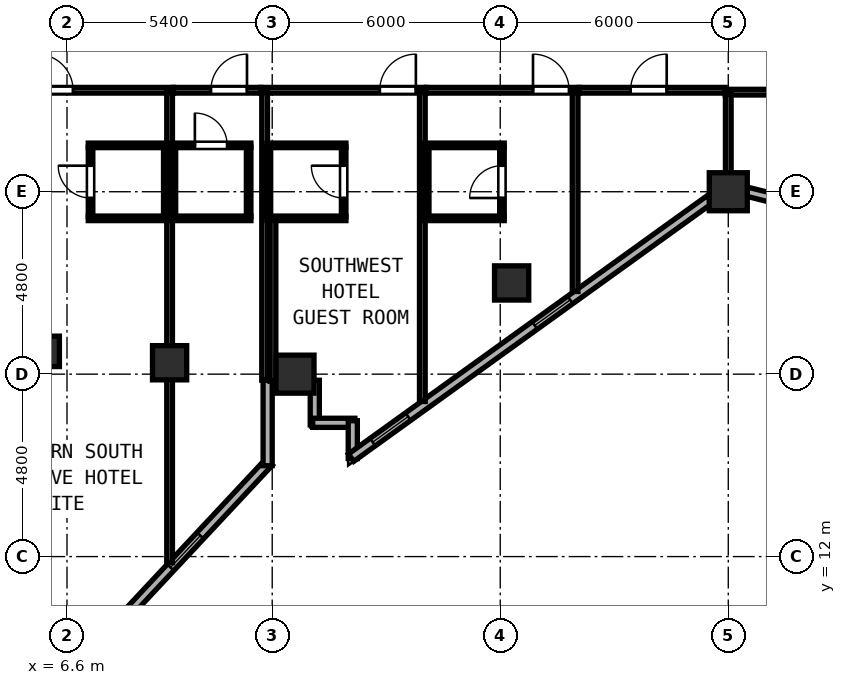
"""IFC4 building model, lengths in metres.
Left out: names, types, materials, properties, quantities, classifications, styles, units other than length and angle.
Written with IfcOpenShell. Run it as: python <this file> out.ifc"""

import sys

from ifc_helpers import new_model, si_unit, direction, frame, frame_2d, origin, origin_2d, place, context, subcontext, project, spatial, rectangle, hollow_rectangle, extrude, element, fill, save


model = new_model("IFC4")
c1 = context("Model", 3, precision=1e-05, world=origin(), true_north=direction((0.0, 1.0)))
c2 = subcontext(c1, "Body", "Model", "MODEL_VIEW")
j1 = project(units=[si_unit("LENGTHUNIT", "METRE"), si_unit("PLANEANGLEUNIT", "RADIAN")], contexts=[c1])
p1 = place(None, origin())
s1 = spatial("IfcSite", under=j1, at=p1, CompositionType="ELEMENT")
p2 = place(p1, origin())
s2 = spatial("IfcBuilding", under=s1, at=p2, CompositionType="ELEMENT")
p3 = place(p2, frame((0.0, 0.0, 98.4)))
s3 = spatial("IfcBuildingStorey", under=s2, at=p3, CompositionType="ELEMENT", Elevation=98.4)
for number, where, z_axis, x_axis in (
    (1, (24.0, 21.6, 0.0), (0.0, 0.0, 1.0), (1.0, 0.0, 0.0)),
    (2, (12.6, 16.8, 0.0), (0.0, 0.0, 1.0), (1.0, 0.0, 0.0)),
):
    element("IfcColumn", number, at=place(p3, frame(where, z_axis=z_axis, x_axis=x_axis)), inside=s3, PredefinedType="COLUMN", context=c2, shape_type="SweptSolid", body=[
        extrude(hollow_rectangle(XDim=1.0, YDim=1.0, WallThickness=0.038, at=origin_2d()), origin(), (0.0, 0.0, 1.0), 3.8),
    ])
p4 = place(p3, frame((6.0, 17.4, 0.0), z_axis=(0.0, 0.0, 1.0), x_axis=(1.0, 0.0, 0.0)))
e3 = element("IfcColumn", 3, at=p4, inside=s3, PredefinedType="COLUMN", context=c2, shape_type="SweptSolid", body=[
    extrude(hollow_rectangle(XDim=0.8, YDim=0.8, WallThickness=0.03, at=origin_2d()), origin(), (0.0, 0.0, 1.0), 3.8),
])
for number, where, z_axis, x_axis in (
    (4, (18.3, 19.2, 0.0), (0.0, 0.0, 1.0), (1.0, 0.0, 0.0)),
    (5, (9.3, 17.1, 0.0), (0.0, 0.0, 1.0), (1.0, 0.0, 0.0)),
):
    element("IfcColumn", number, at=place(p3, frame(where, z_axis=z_axis, x_axis=x_axis)), inside=s3, PredefinedType="COLUMN", context=c2, shape_type="SweptSolid", body=[
        extrude(hollow_rectangle(XDim=0.9, YDim=0.9, WallThickness=0.034, at=origin_2d()), origin(), (0.0, 0.0, 1.0), 3.8),
    ])
p5 = place(p3, frame((13.12, 16.64, 0.0), z_axis=(0.0, 0.0, 1.0), x_axis=(0.0, -1.0, 0.0)))
e6 = element("IfcWall", 6, at=p5, inside=s3, PredefinedType="SOLIDWALL", context=c2, shape_type="SweptSolid", body=[
    extrude(rectangle(XDim=1.175, YDim=0.24, at=frame_2d((0.587, 0.0))), origin(), (0.0, 0.0, 1.0), 3.6),
])
p6 = place(p3, frame((13.065, 15.52, 0.0), z_axis=(0.0, 0.0, 1.0), x_axis=(1.0, 0.0, 0.0)))
e7 = element("IfcWall", 7, at=p6, inside=s3, PredefinedType="SOLIDWALL", context=c2, shape_type="SweptSolid", body=[
    extrude(rectangle(XDim=1.11, YDim=0.24, at=frame_2d((0.555, 0.0))), origin(), (0.0, 0.0, 1.0), 3.6),
])
p7 = place(p3, frame((14.12, 15.575, 0.0), z_axis=(0.0, 0.0, 1.0), x_axis=(0.0, -1.0, 0.0)))
e8 = element("IfcWall", 8, at=p7, inside=s3, PredefinedType="SOLIDWALL", context=c2, shape_type="SweptSolid", body=[
    extrude(rectangle(XDim=0.996, YDim=0.24, at=frame_2d((0.498, 0.0))), origin(), (0.0, 0.0, 1.0), 3.6),
])
p8 = place(p3, frame((14.075, 14.602, 0.0), z_axis=(0.0, 0.0, 1.0), x_axis=(0.811543504691, 0.584291998913, 0.0)))
e9 = element("IfcWall", 9, at=p8, inside=s3, PredefinedType="SOLIDWALL", context=c2, shape_type="SweptSolid", body=[
    extrude(rectangle(XDim=11.623, YDim=0.24, at=frame_2d((5.812, 0.0))), origin(), (0.0, 0.0, 1.0), 3.145),
])
p9 = place(p8, frame((0.7, 0.0, 0.85)))
e10 = element("IfcOpeningElement", 10, at=p9, cuts=e9, PredefinedType="OPENING", context=c2, shape_type="SweptSolid", body=[
    extrude(rectangle(XDim=1.15, YDim=1.8, at=frame_2d((0.575, 0.9))), frame((0.0, 0.13, 0.0), z_axis=(0.0, -1.0, 0.0), x_axis=(1.0, 0.0, 0.0)), (0.0, 0.0, 1.0), 0.26),
])
p10 = place(p8, frame((5.954, 0.0, 0.85)))
e11 = element("IfcOpeningElement", 11, at=p10, cuts=e9, PredefinedType="OPENING", context=c2, shape_type="SweptSolid", body=[
    extrude(rectangle(XDim=1.15, YDim=1.8, at=frame_2d((0.575, 0.9))), frame((0.0, 0.13, 0.0), z_axis=(0.0, -1.0, 0.0), x_axis=(1.0, 0.0, 0.0)), (0.0, 0.0, 1.0), 0.26),
])
p11 = place(p3, frame((24.492, 21.601, 0.0), z_axis=(0.0, 0.0, 1.0), x_axis=(0.970145683738, -0.242522890311, 0.0)))
e12 = element("IfcWall", 12, at=p11, inside=s3, PredefinedType="SOLIDWALL", context=c2, shape_type="SweptSolid", body=[
    extrude(rectangle(XDim=4.511, YDim=0.24, at=frame_2d((2.255, 0.0))), origin(), (0.0, 0.0, 1.0), 3.145),
])
p12 = place(p11, frame((0.7, 0.0, 0.85)))
e13 = element("IfcOpeningElement", 13, at=p12, cuts=e12, PredefinedType="OPENING", context=c2, shape_type="SweptSolid", body=[
    extrude(rectangle(XDim=1.15, YDim=1.8, at=frame_2d((0.575, 0.9))), frame((0.0, 0.13, 0.0), z_axis=(0.0, -1.0, 0.0), x_axis=(1.0, 0.0, 0.0)), (0.0, 0.0, 1.0), 0.26),
])
p13 = place(p3, frame((5.158, 7.257, 0.0), z_axis=(0.0, 0.0, 1.0), x_axis=(0.68291649943, 0.730496444075, 0.0)))
e14 = element("IfcWall", 14, at=p13, inside=s3, PredefinedType="SOLIDWALL", context=c2, shape_type="SweptSolid", body=[
    extrude(rectangle(XDim=9.898, YDim=0.24, at=frame_2d((4.949, 0.0))), origin(), (0.0, 0.0, 1.0), 3.6),
])
p14 = place(p13, frame((0.7, 0.0, 0.85)))
e15 = element("IfcOpeningElement", 15, at=p14, cuts=e14, PredefinedType="OPENING", context=c2, shape_type="SweptSolid", body=[
    extrude(rectangle(XDim=1.15, YDim=1.8, at=frame_2d((0.575, 0.9))), frame((0.0, 0.13, 0.0), z_axis=(0.0, -1.0, 0.0), x_axis=(1.0, 0.0, 0.0)), (0.0, 0.0, 1.0), 0.26),
])
p15 = place(p13, frame((6.1, 0.0, 0.85)))
e16 = element("IfcOpeningElement", 16, at=p15, cuts=e14, PredefinedType="OPENING", context=c2, shape_type="SweptSolid", body=[
    extrude(rectangle(XDim=1.15, YDim=1.8, at=frame_2d((0.575, 0.9))), frame((0.0, 0.13, 0.0), z_axis=(0.0, -1.0, 0.0), x_axis=(1.0, 0.0, 0.0)), (0.0, 0.0, 1.0), 0.26),
])
p16 = place(p3, frame((11.88, 14.392, 0.0), z_axis=(0.0, 0.0, 1.0), x_axis=(0.0, 1.0, 0.0)))
e17 = element("IfcWall", 17, at=p16, inside=s3, PredefinedType="SOLIDWALL", context=c2, shape_type="SweptSolid", body=[
    extrude(rectangle(XDim=2.248, YDim=0.24, at=frame_2d((1.124, 0.0))), origin(), (0.0, 0.0, 1.0), 3.6),
])
p17 = place(p3, frame((23.92, 24.22, 0.0), z_axis=(0.0, 0.0, 1.0), x_axis=(1.0, 0.0, 0.0)))
e18 = element("IfcWall", 18, at=p17, inside=s3, PredefinedType="PARTITIONING", context=c2, shape_type="SweptSolid", body=[
    extrude(rectangle(XDim=7.36, YDim=0.15, at=frame_2d((3.68, 0.0))), origin(), (0.0, 0.0, 1.0), 3.6),
])
p18 = place(p17, frame((4.075, 0.0, 0.0), z_axis=(0.0, 0.0, 1.0), x_axis=(-1.0, 0.0, 0.0)))
e19 = element("IfcOpeningElement", 19, at=p18, cuts=e18, PredefinedType="OPENING", context=c2, shape_type="SweptSolid", body=[
    extrude(rectangle(XDim=0.95, YDim=2.12, at=frame_2d((0.475, 1.06))), frame((0.0, 0.085, 0.0), z_axis=(0.0, -1.0, 0.0), x_axis=(1.0, 0.0, 0.0)), (0.0, 0.0, 1.0), 0.17),
])
p19 = place(p3, frame((24.0, 21.819, 0.0), z_axis=(0.0, 0.0, 1.0), x_axis=(0.0, 1.0, 0.0)))
e20 = element("IfcWall", 20, at=p19, inside=s3, PredefinedType="PARTITIONING", context=c2, shape_type="SweptSolid", body=[
    extrude(rectangle(XDim=2.341, YDim=0.15, at=frame_2d((1.171, 0.0))), origin(), (0.0, 0.0, 1.0), 3.145),
])
p20 = place(p3, frame((11.7, 24.27, 0.0), z_axis=(0.0, 0.0, 1.0), x_axis=(1.0, 0.0, 0.0)))
e21 = element("IfcWall", 21, at=p20, inside=s3, PredefinedType="PARTITIONING", context=c2, shape_type="SweptSolid", body=[
    extrude(rectangle(XDim=4.35, YDim=0.15, at=frame_2d((2.175, 0.0))), origin(), (0.0, 0.0, 1.0), 3.6),
])
p21 = place(p20, frame((4.08, 0.0, 0.0), z_axis=(0.0, 0.0, 1.0), x_axis=(-1.0, 0.0, 0.0)))
e22 = element("IfcOpeningElement", 22, at=p21, cuts=e21, PredefinedType="OPENING", context=c2, shape_type="SweptSolid", body=[
    extrude(rectangle(XDim=0.95, YDim=2.15, at=frame_2d((0.475, 1.075))), frame((0.0, 0.085, 0.0), z_axis=(0.0, -1.0, 0.0), x_axis=(1.0, 0.0, 0.0)), (0.0, 0.0, 1.0), 0.17),
])
p22 = place(p3, frame((11.8, 16.642, 0.0), z_axis=(0.0, 0.0, 1.0), x_axis=(0.0, 1.0, 0.0)))
e23 = element("IfcWall", 23, at=p22, inside=s3, PredefinedType="PARTITIONING", context=c2, shape_type="SweptSolid", body=[
    extrude(rectangle(XDim=7.568, YDim=0.15, at=frame_2d((3.784, 0.0))), origin(), (0.0, 0.0, 1.0), 3.6),
])
p23 = place(p3, frame((15.95, 16.081, 0.0), z_axis=(0.0, 0.0, 1.0), x_axis=(0.0, 1.0, 0.0)))
e24 = element("IfcWall", 24, at=p23, inside=s3, PredefinedType="PARTITIONING", context=c2, shape_type="SweptSolid", body=[
    extrude(rectangle(XDim=8.129, YDim=0.15, at=frame_2d((4.064, 0.0))), origin(), (0.0, 0.0, 1.0), 3.6),
])
for number, where, z_axis, x_axis in (
    (25, (11.86, 22.82, 0.0), (0.0, 0.0, 1.0), (1.0, 0.0, 0.0)),
    (26, (11.86, 20.9, 0.0), (0.0, 0.0, 1.0), (1.0, 0.0, 0.0)),
):
    element("IfcWall", number, at=place(p3, frame(where, z_axis=z_axis, x_axis=x_axis)), inside=s3, PredefinedType="PARTITIONING", context=c2, shape_type="SweptSolid", body=[
        extrude(rectangle(XDim=2.08, YDim=0.12, at=frame_2d((1.04, 0.0))), origin(), (0.0, 0.0, 1.0), 3.6),
    ])
p24 = place(p3, frame((11.9, 20.945, 0.0), z_axis=(0.0, 0.0, 1.0), x_axis=(0.0, 1.0, 0.0)))
e27 = element("IfcWall", 27, at=p24, inside=s3, PredefinedType="PARTITIONING", context=c2, shape_type="SweptSolid", body=[
    extrude(rectangle(XDim=1.83, YDim=0.12, at=frame_2d((0.915, 0.0))), origin(), (0.0, 0.0, 1.0), 3.6),
])
p25 = place(p3, frame((13.88, 20.945, 0.0), z_axis=(0.0, 0.0, 1.0), x_axis=(0.0, 1.0, 0.0)))
e28 = element("IfcWall", 28, at=p25, inside=s3, PredefinedType="PARTITIONING", context=c2, shape_type="SweptSolid", body=[
    extrude(rectangle(XDim=1.83, YDim=0.12, at=frame_2d((0.915, 0.0))), origin(), (0.0, 0.0, 1.0), 3.6),
])
p26 = place(p25, frame((0.49, 0.0, 0.0)))
e29 = element("IfcOpeningElement", 29, at=p26, cuts=e28, PredefinedType="OPENING", context=c2, shape_type="SweptSolid", body=[
    extrude(rectangle(XDim=0.85, YDim=2.1, at=frame_2d((0.425, 1.05))), frame((0.0, 0.07, 0.0), z_axis=(0.0, -1.0, 0.0), x_axis=(1.0, 0.0, 0.0)), (0.0, 0.0, 1.0), 0.14),
])
p27 = place(p3, frame((16.052, 24.27, 0.0), z_axis=(0.0, 0.0, 1.0), x_axis=(1.0, 0.0, 0.0)))
e30 = element("IfcWall", 30, at=p27, inside=s3, PredefinedType="PARTITIONING", context=c2, shape_type="SweptSolid", body=[
    extrude(rectangle(XDim=4.018, YDim=0.15, at=frame_2d((2.009, 0.0))), origin(), (0.0, 0.0, 1.0), 3.6),
])
p28 = place(p27, frame((3.76, 0.0, 0.0), z_axis=(0.0, 0.0, 1.0), x_axis=(-1.0, 0.0, 0.0)))
e31 = element("IfcOpeningElement", 31, at=p28, cuts=e30, PredefinedType="OPENING", context=c2, shape_type="SweptSolid", body=[
    extrude(rectangle(XDim=0.95, YDim=2.15, at=frame_2d((0.475, 1.075))), frame((0.0, 0.085, 0.0), z_axis=(0.0, -1.0, 0.0), x_axis=(1.0, 0.0, 0.0)), (0.0, 0.0, 1.0), 0.17),
])
p29 = place(p3, frame((19.97, 18.976, 0.0), z_axis=(0.0, 0.0, 1.0), x_axis=(0.0, 1.0, 0.0)))
e32 = element("IfcWall", 32, at=p29, inside=s3, PredefinedType="PARTITIONING", context=c2, shape_type="SweptSolid", body=[
    extrude(rectangle(XDim=5.234, YDim=0.15, at=frame_2d((2.617, 0.0))), origin(), (0.0, 0.0, 1.0), 3.6),
])
for number, where, z_axis, x_axis in (
    (33, (16.01, 22.82, 0.0), (0.0, 0.0, 1.0), (1.0, 0.0, 0.0)),
    (34, (16.01, 20.9, 0.0), (0.0, 0.0, 1.0), (1.0, 0.0, 0.0)),
):
    element("IfcWall", number, at=place(p3, frame(where, z_axis=z_axis, x_axis=x_axis)), inside=s3, PredefinedType="PARTITIONING", context=c2, shape_type="SweptSolid", body=[
        extrude(rectangle(XDim=2.095, YDim=0.12, at=frame_2d((1.047, 0.0))), origin(), (0.0, 0.0, 1.0), 3.6),
    ])
p30 = place(p3, frame((16.065, 20.945, 0.0), z_axis=(0.0, 0.0, 1.0), x_axis=(0.0, 1.0, 0.0)))
e35 = element("IfcWall", 35, at=p30, inside=s3, PredefinedType="PARTITIONING", context=c2, shape_type="SweptSolid", body=[
    extrude(rectangle(XDim=1.83, YDim=0.12, at=frame_2d((0.915, 0.0))), origin(), (0.0, 0.0, 1.0), 3.6),
])
p31 = place(p3, frame((18.045, 20.945, 0.0), z_axis=(0.0, 0.0, 1.0), x_axis=(0.0, 1.0, 0.0)))
e36 = element("IfcWall", 36, at=p31, inside=s3, PredefinedType="PARTITIONING", context=c2, shape_type="SweptSolid", body=[
    extrude(rectangle(XDim=1.83, YDim=0.12, at=frame_2d((0.915, 0.0))), origin(), (0.0, 0.0, 1.0), 3.6),
])
p32 = place(p31, frame((0.49, 0.0, 0.0)))
e37 = element("IfcOpeningElement", 37, at=p32, cuts=e36, PredefinedType="OPENING", context=c2, shape_type="SweptSolid", body=[
    extrude(rectangle(XDim=0.85, YDim=2.1, at=frame_2d((0.425, 1.05))), frame((0.0, 0.07, 0.0), z_axis=(0.0, -1.0, 0.0), x_axis=(1.0, 0.0, 0.0)), (0.0, 0.0, 1.0), 0.14),
])
p33 = place(p3, frame((20.072, 24.27, 0.0), z_axis=(0.0, 0.0, 1.0), x_axis=(1.0, 0.0, 0.0)))
e38 = element("IfcWall", 38, at=p33, inside=s3, PredefinedType="PARTITIONING", context=c2, shape_type="SweptSolid", body=[
    extrude(rectangle(XDim=3.846, YDim=0.15, at=frame_2d((1.923, 0.0))), origin(), (0.0, 0.0, 1.0), 3.6),
])
p34 = place(p33, frame((2.308, 0.0, 0.0), z_axis=(0.0, 0.0, 1.0), x_axis=(-1.0, 0.0, 0.0)))
e39 = element("IfcOpeningElement", 39, at=p34, cuts=e38, PredefinedType="OPENING", context=c2, shape_type="SweptSolid", body=[
    extrude(rectangle(XDim=0.95, YDim=2.12, at=frame_2d((0.475, 1.06))), frame((0.0, 0.085, 0.0), z_axis=(0.0, -1.0, 0.0), x_axis=(1.0, 0.0, 0.0)), (0.0, 0.0, 1.0), 0.17),
])
p35 = place(p3, frame((3.405, 24.27, 0.0), z_axis=(0.0, 0.0, 1.0), x_axis=(1.0, 0.0, 0.0)))
e40 = element("IfcWall", 40, at=p35, inside=s3, PredefinedType="PARTITIONING", context=c2, shape_type="SweptSolid", body=[
    extrude(rectangle(XDim=5.995, YDim=0.15, at=frame_2d((2.998, 0.0))), origin(), (0.0, 0.0, 1.0), 3.6),
])
p36 = place(p35, frame((3.355, 0.0, 0.0), z_axis=(0.0, 0.0, 1.0), x_axis=(-1.0, 0.0, 0.0)))
e41 = element("IfcOpeningElement", 41, at=p36, cuts=e40, PredefinedType="OPENING", context=c2, shape_type="SweptSolid", body=[
    extrude(rectangle(XDim=0.95, YDim=2.18, at=frame_2d((0.475, 1.09))), frame((0.0, 0.085, 0.0), z_axis=(0.0, -1.0, 0.0), x_axis=(1.0, 0.0, 0.0)), (0.0, 0.0, 1.0), 0.17),
])
p37 = place(p3, frame((9.3, 11.841, 0.0), z_axis=(0.0, 0.0, 1.0), x_axis=(0.0, 1.0, 0.0)))
e42 = element("IfcWall", 42, at=p37, inside=s3, PredefinedType="PARTITIONING", context=c2, shape_type="SweptSolid", body=[
    extrude(rectangle(XDim=12.369, YDim=0.15, at=frame_2d((6.184, 0.0))), origin(), (0.0, 0.0, 1.0), 3.6),
])
for number, where, z_axis, x_axis in (
    (43, (7.16, 22.82, 0.0), (0.0, 0.0, 1.0), (1.0, 0.0, 0.0)),
    (44, (7.16, 20.9, 0.0), (0.0, 0.0, 1.0), (1.0, 0.0, 0.0)),
):
    element("IfcWall", number, at=place(p3, frame(where, z_axis=z_axis, x_axis=x_axis)), inside=s3, PredefinedType="PARTITIONING", context=c2, shape_type="SweptSolid", body=[
        extrude(rectangle(XDim=2.08, YDim=0.12, at=frame_2d((1.04, 0.0))), origin(), (0.0, 0.0, 1.0), 3.6),
    ])
p38 = place(p3, frame((7.22, 20.945, 0.0), z_axis=(0.0, 0.0, 1.0), x_axis=(0.0, 1.0, 0.0)))
e45 = element("IfcWall", 45, at=p38, inside=s3, PredefinedType="PARTITIONING", context=c2, shape_type="SweptSolid", body=[
    extrude(rectangle(XDim=1.83, YDim=0.12, at=frame_2d((0.915, 0.0))), origin(), (0.0, 0.0, 1.0), 3.6),
])
p39 = place(p38, frame((1.34, 0.0, 0.0), z_axis=(0.0, 0.0, 1.0), x_axis=(-1.0, 0.0, 0.0)))
e46 = element("IfcOpeningElement", 46, at=p39, cuts=e45, PredefinedType="OPENING", context=c2, shape_type="SweptSolid", body=[
    extrude(rectangle(XDim=0.85, YDim=2.1, at=frame_2d((0.425, 1.05))), frame((0.0, 0.07, 0.0), z_axis=(0.0, -1.0, 0.0), x_axis=(1.0, 0.0, 0.0)), (0.0, 0.0, 1.0), 0.14),
])
p40 = place(p3, frame((9.2, 20.945, 0.0), z_axis=(0.0, 0.0, 1.0), x_axis=(0.0, 1.0, 0.0)))
e47 = element("IfcWall", 47, at=p40, inside=s3, PredefinedType="PARTITIONING", context=c2, shape_type="SweptSolid", body=[
    extrude(rectangle(XDim=1.83, YDim=0.12, at=frame_2d((0.915, 0.0))), origin(), (0.0, 0.0, 1.0), 3.6),
])
p41 = place(p3, frame((9.402, 24.27, 0.0), z_axis=(0.0, 0.0, 1.0), x_axis=(1.0, 0.0, 0.0)))
e48 = element("IfcWall", 48, at=p41, inside=s3, PredefinedType="PARTITIONING", context=c2, shape_type="SweptSolid", body=[
    extrude(rectangle(XDim=2.296, YDim=0.15, at=frame_2d((1.148, 0.0))), origin(), (0.0, 0.0, 1.0), 3.6),
])
p42 = place(p41, frame((1.934, 0.0, 0.0), z_axis=(0.0, 0.0, 1.0), x_axis=(-1.0, 0.0, 0.0)))
e49 = element("IfcOpeningElement", 49, at=p42, cuts=e48, PredefinedType="OPENING", context=c2, shape_type="SweptSolid", body=[
    extrude(rectangle(XDim=0.95, YDim=2.15, at=frame_2d((0.475, 1.075))), frame((0.0, 0.085, 0.0), z_axis=(0.0, -1.0, 0.0), x_axis=(1.0, 0.0, 0.0)), (0.0, 0.0, 1.0), 0.17),
])
p43 = place(p3, frame((12.02, 16.612, 0.0), z_axis=(0.0, 0.0, 1.0), x_axis=(0.0, 1.0, 0.0)))
e50 = element("IfcWall", 50, at=p43, inside=s3, PredefinedType="PARTITIONING", context=c2, shape_type="SweptSolid", body=[
    extrude(rectangle(XDim=4.243, YDim=0.15, at=frame_2d((2.122, 0.0))), origin(), (0.0, 0.0, 1.0), 3.6),
])
p44 = place(p3, frame((9.36, 22.82, 0.0), z_axis=(0.0, 0.0, 1.0), x_axis=(1.0, 0.0, 0.0)))
e51 = element("IfcWall", 51, at=p44, inside=s3, PredefinedType="PARTITIONING", context=c2, shape_type="SweptSolid", body=[
    extrude(rectangle(XDim=2.08, YDim=0.12, at=frame_2d((1.04, 0.0))), origin(), (0.0, 0.0, 1.0), 3.6),
])
p45 = place(p44, frame((1.455, 0.0, 0.0), z_axis=(0.0, 0.0, 1.0), x_axis=(-1.0, 0.0, 0.0)))
e52 = element("IfcOpeningElement", 52, at=p45, cuts=e51, PredefinedType="OPENING", context=c2, shape_type="SweptSolid", body=[
    extrude(rectangle(XDim=0.85, YDim=2.1, at=frame_2d((0.425, 1.05))), frame((0.0, 0.07, 0.0), z_axis=(0.0, -1.0, 0.0), x_axis=(1.0, 0.0, 0.0)), (0.0, 0.0, 1.0), 0.14),
])
p46 = place(p3, frame((9.36, 20.9, 0.0), z_axis=(0.0, 0.0, 1.0), x_axis=(1.0, 0.0, 0.0)))
e53 = element("IfcWall", 53, at=p46, inside=s3, PredefinedType="PARTITIONING", context=c2, shape_type="SweptSolid", body=[
    extrude(rectangle(XDim=2.08, YDim=0.12, at=frame_2d((1.04, 0.0))), origin(), (0.0, 0.0, 1.0), 3.6),
])
for number, where, z_axis, x_axis in (
    (54, (9.4, 20.945, 0.0), (0.0, 0.0, 1.0), (0.0, 1.0, 0.0)),
    (55, (11.38, 20.945, 0.0), (0.0, 0.0, 1.0), (0.0, 1.0, 0.0)),
):
    element("IfcWall", number, at=place(p3, frame(where, z_axis=z_axis, x_axis=x_axis)), inside=s3, PredefinedType="PARTITIONING", context=c2, shape_type="SweptSolid", body=[
        extrude(rectangle(XDim=1.83, YDim=0.12, at=frame_2d((0.915, 0.0))), origin(), (0.0, 0.0, 1.0), 3.6),
    ])
p47 = place(p9, origin())
e56 = element("IfcWindow", 56, at=p47, inside=s3, PartitioningType="SINGLE_PANEL", PredefinedType="WINDOW", context=c2, shape_type="SweptSolid", body=[
    extrude(rectangle(XDim=1.15, YDim=1.8, at=frame_2d((0.575, 0.9))), frame((0.0, 0.03, 0.0), z_axis=(0.0, -1.0, 0.0), x_axis=(1.0, 0.0, 0.0)), (0.0, 0.0, 1.0), 0.06),
])
fill(e10, e56)
p48 = place(p10, origin())
e57 = element("IfcWindow", 57, at=p48, inside=s3, PartitioningType="SINGLE_PANEL", PredefinedType="WINDOW", context=c2, shape_type="SweptSolid", body=[
    extrude(rectangle(XDim=1.15, YDim=1.8, at=frame_2d((0.575, 0.9))), frame((0.0, 0.03, 0.0), z_axis=(0.0, -1.0, 0.0), x_axis=(1.0, 0.0, 0.0)), (0.0, 0.0, 1.0), 0.06),
])
fill(e11, e57)
p49 = place(p15, origin())
e58 = element("IfcWindow", 58, at=p49, inside=s3, PartitioningType="SINGLE_PANEL", PredefinedType="WINDOW", context=c2, shape_type="SweptSolid", body=[
    extrude(rectangle(XDim=1.15, YDim=1.8, at=frame_2d((0.575, 0.9))), frame((0.0, 0.03, 0.0), z_axis=(0.0, -1.0, 0.0), x_axis=(1.0, 0.0, 0.0)), (0.0, 0.0, 1.0), 0.06),
])
fill(e16, e58)
p50 = place(p21, origin())
e59 = element("IfcDoor", 59, at=p50, inside=s3, OperationType="SINGLE_SWING_LEFT", PredefinedType="DOOR", context=c2, shape_type="SweptSolid", body=[
    extrude(rectangle(XDim=0.95, YDim=2.15, at=frame_2d((0.475, 1.075))), frame((0.0, 0.025, 0.0), z_axis=(0.0, -1.0, 0.0), x_axis=(1.0, 0.0, 0.0)), (0.0, 0.0, 1.0), 0.05),
])
fill(e22, e59)
p51 = place(p26, origin())
e60 = element("IfcDoor", 60, at=p51, inside=s3, OperationType="SINGLE_SWING_RIGHT", PredefinedType="DOOR", context=c2, shape_type="SweptSolid", body=[
    extrude(rectangle(XDim=0.85, YDim=2.1, at=frame_2d((0.425, 1.05))), frame((0.0, 0.025, 0.0), z_axis=(0.0, -1.0, 0.0), x_axis=(1.0, 0.0, 0.0)), (0.0, 0.0, 1.0), 0.05),
])
fill(e29, e60)
p52 = place(p28, origin())
e61 = element("IfcDoor", 61, at=p52, inside=s3, OperationType="SINGLE_SWING_RIGHT", PredefinedType="DOOR", context=c2, shape_type="SweptSolid", body=[
    extrude(rectangle(XDim=0.95, YDim=2.15, at=frame_2d((0.475, 1.075))), frame((0.0, 0.025, 0.0), z_axis=(0.0, -1.0, 0.0), x_axis=(1.0, 0.0, 0.0)), (0.0, 0.0, 1.0), 0.05),
])
fill(e31, e61)
p53 = place(p32, origin())
e62 = element("IfcDoor", 62, at=p53, inside=s3, OperationType="SINGLE_SWING_LEFT", PredefinedType="DOOR", context=c2, shape_type="SweptSolid", body=[
    extrude(rectangle(XDim=0.85, YDim=2.1, at=frame_2d((0.425, 1.05))), frame((0.0, 0.025, 0.0), z_axis=(0.0, -1.0, 0.0), x_axis=(1.0, 0.0, 0.0)), (0.0, 0.0, 1.0), 0.05),
])
fill(e37, e62)
p54 = place(p34, origin())
e63 = element("IfcDoor", 63, at=p54, inside=s3, OperationType="SINGLE_SWING_LEFT", PredefinedType="DOOR", context=c2, shape_type="SweptSolid", body=[
    extrude(rectangle(XDim=0.95, YDim=2.12, at=frame_2d((0.475, 1.06))), frame((0.0, 0.025, 0.0), z_axis=(0.0, -1.0, 0.0), x_axis=(1.0, 0.0, 0.0)), (0.0, 0.0, 1.0), 0.05),
])
fill(e39, e63)
p55 = place(p36, origin())
e64 = element("IfcDoor", 64, at=p55, inside=s3, OperationType="SINGLE_SWING_RIGHT", PredefinedType="DOOR", context=c2, shape_type="SweptSolid", body=[
    extrude(rectangle(XDim=0.95, YDim=2.18, at=frame_2d((0.475, 1.09))), frame((0.0, 0.025, 0.0), z_axis=(0.0, -1.0, 0.0), x_axis=(1.0, 0.0, 0.0)), (0.0, 0.0, 1.0), 0.05),
])
fill(e41, e64)
p56 = place(p39, origin())
e65 = element("IfcDoor", 65, at=p56, inside=s3, OperationType="SINGLE_SWING_LEFT", PredefinedType="DOOR", context=c2, shape_type="SweptSolid", body=[
    extrude(rectangle(XDim=0.85, YDim=2.1, at=frame_2d((0.425, 1.05))), frame((0.0, 0.025, 0.0), z_axis=(0.0, -1.0, 0.0), x_axis=(1.0, 0.0, 0.0)), (0.0, 0.0, 1.0), 0.05),
])
fill(e46, e65)
p57 = place(p42, origin())
e66 = element("IfcDoor", 66, at=p57, inside=s3, OperationType="SINGLE_SWING_LEFT", PredefinedType="DOOR", context=c2, shape_type="SweptSolid", body=[
    extrude(rectangle(XDim=0.95, YDim=2.15, at=frame_2d((0.475, 1.075))), frame((0.0, 0.025, 0.0), z_axis=(0.0, -1.0, 0.0), x_axis=(1.0, 0.0, 0.0)), (0.0, 0.0, 1.0), 0.05),
])
fill(e49, e66)
p58 = place(p45, origin())
e67 = element("IfcDoor", 67, at=p58, inside=s3, OperationType="SINGLE_SWING_RIGHT", PredefinedType="DOOR", context=c2, shape_type="SweptSolid", body=[
    extrude(rectangle(XDim=0.85, YDim=2.1, at=frame_2d((0.425, 1.05))), frame((0.0, 0.025, 0.0), z_axis=(0.0, -1.0, 0.0), x_axis=(1.0, 0.0, 0.0)), (0.0, 0.0, 1.0), 0.05),
])
fill(e52, e67)
save(model, sys.argv[1])
